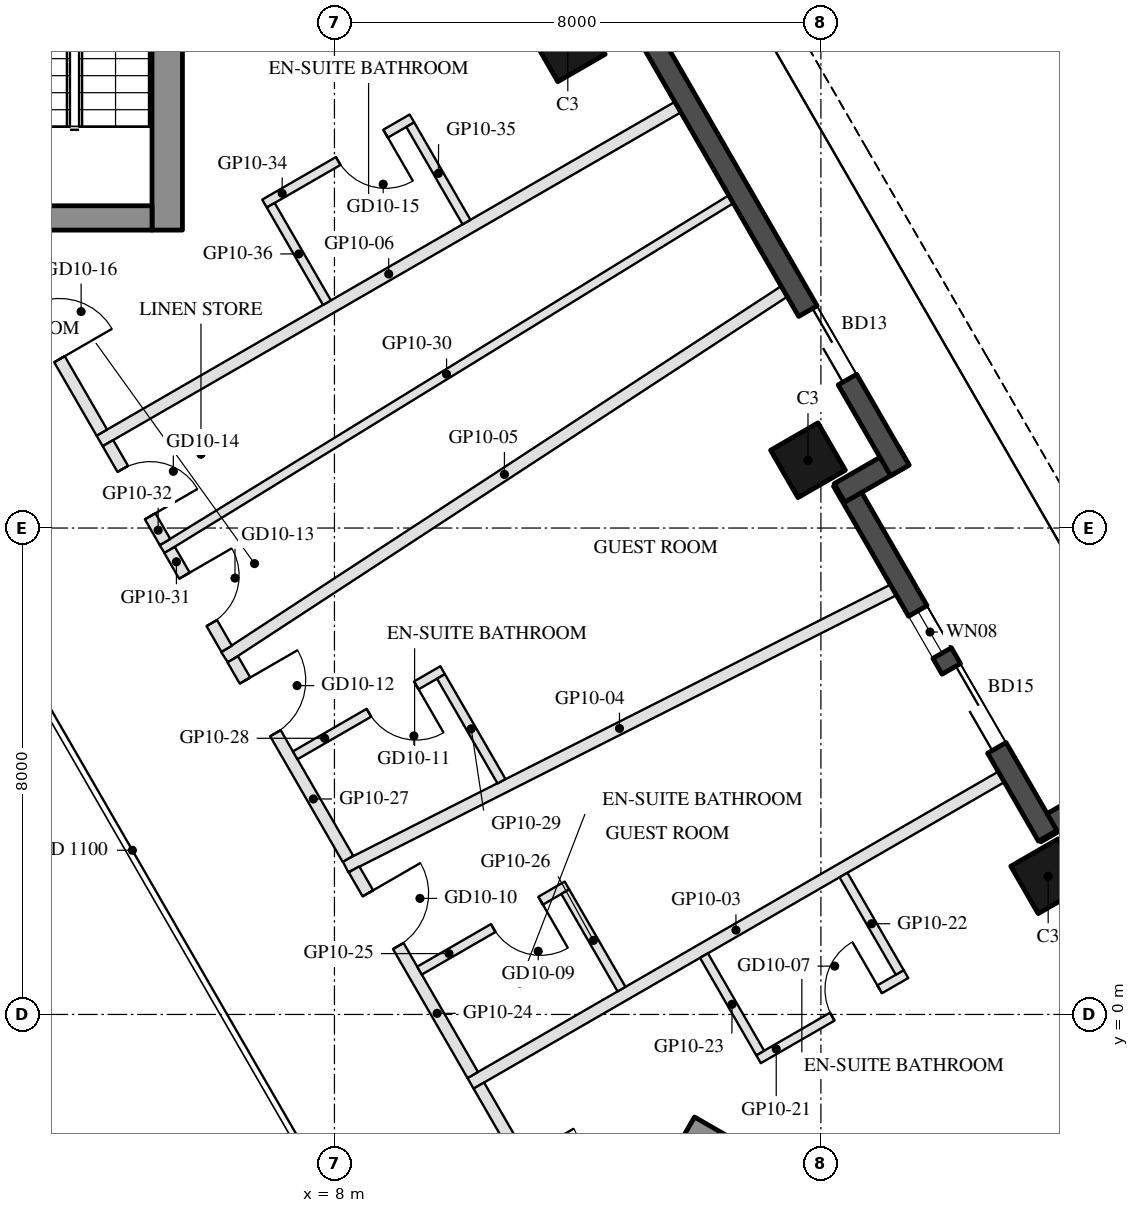
"""IFC4 building model, lengths in metres.
Left out: names, types, materials, properties, quantities, classifications, styles, units other than length and angle.
Written with IfcOpenShell. Run it as: python <this file> out.ifc"""

import sys

from ifc_helpers import new_model, si_unit, direction, frame, frame_2d, origin, origin_2d, place, context, subcontext, project, spatial, rectangle, hollow_rectangle, extrude, element, fill, save


model = new_model("IFC4")
c1 = context("Model", 3, precision=1e-05, world=origin(), true_north=direction((0.0, 1.0)))
c2 = subcontext(c1, "Body", "Model", "MODEL_VIEW")
j1 = project(units=[si_unit("LENGTHUNIT", "METRE"), si_unit("PLANEANGLEUNIT", "RADIAN")], contexts=[c1])
p1 = place(None, origin())
s1 = spatial("IfcSite", under=j1, at=p1, CompositionType="ELEMENT")
p2 = place(p1, origin())
s2 = spatial("IfcBuilding", under=s1, at=p2, CompositionType="ELEMENT")
p3 = place(p2, frame((0.0, 0.0, 116.8)))
s3 = spatial("IfcBuildingStorey", under=s2, at=p3, CompositionType="ELEMENT", Elevation=116.8)
for number, where, z_axis, x_axis in (
    (1, (19.738, 2.273, 0.0), (0.0, 0.0, 1.0), (-0.5, 0.866, 0.0)),
    (2, (15.788, 9.115, 0.0), (0.0, 0.0, 1.0), (-0.5, 0.866, 0.0)),
    (3, (11.838, 15.957, 0.0), (0.0, 0.0, 1.0), (-0.5, 0.866, 0.0)),
):
    element("IfcColumn", number, at=place(p3, frame(where, z_axis=z_axis, x_axis=x_axis)), inside=s3, PredefinedType="COLUMN", context=c2, shape_type="SweptSolid", body=[
        extrude(hollow_rectangle(XDim=0.9, YDim=0.9, WallThickness=0.04, at=origin_2d()), origin(), (0.0, 0.0, 1.0), 3.7),
    ])
p4 = place(p3, frame((20.588, 3.601, 0.0), z_axis=(0.0, 0.0, 1.0), x_axis=(-0.866005645448, -0.500034220881, 0.0)))
e4 = element("IfcWall", 4, at=p4, inside=s3, PredefinedType="SOLIDWALL", context=c2, shape_type="SweptSolid", body=[
    extrude(rectangle(XDim=1.22, YDim=0.35, at=frame_2d((0.61, 0.0))), origin(), (0.0, 0.0, 1.0), 3.55),
])
p5 = place(p3, frame((19.729, 2.938, 0.0), z_axis=(0.0, 0.0, 1.0), x_axis=(-0.499976430342, 0.866039011305, 0.0)))
e5 = element("IfcWall", 5, at=p5, inside=s3, PredefinedType="SOLIDWALL", context=c2, shape_type="SweptSolid", body=[
    extrude(rectangle(XDim=6.74, YDim=0.35, at=frame_2d((3.37, 0.0))), origin(), (0.0, 0.0, 1.0), 3.55),
])
p6 = place(p5, frame((1.67, 0.0, 0.0)))
e6 = element("IfcOpeningElement", 6, at=p6, cuts=e5, PredefinedType="OPENING", context=c2, shape_type="SweptSolid", body=[
    extrude(rectangle(XDim=1.5, YDim=2.4, at=frame_2d((0.75, 1.2))), frame((0.0, 0.185, 0.0), z_axis=(0.0, -1.0, 0.0), x_axis=(1.0, 0.0, 0.0)), (0.0, 0.0, 1.0), 0.37),
])
p7 = place(p5, frame((3.47, 0.0, 0.3)))
e7 = element("IfcOpeningElement", 7, at=p7, cuts=e5, PredefinedType="OPENING", context=c2, shape_type="SweptSolid", body=[
    extrude(rectangle(XDim=0.8, YDim=2.65, at=frame_2d((0.4, 1.325))), frame((0.0, 0.185, 0.0), z_axis=(0.0, -1.0, 0.0), x_axis=(1.0, 0.0, 0.0)), (0.0, 0.0, 1.0), 0.37),
])
p8 = place(p3, frame((16.306, 8.577, 0.0), z_axis=(0.0, 0.0, 1.0), x_axis=(0.866092288191, 0.499884134912, 0.0)))
e8 = element("IfcWall", 8, at=p8, inside=s3, PredefinedType="SOLIDWALL", context=c2, shape_type="SweptSolid", body=[
    extrude(rectangle(XDim=1.22, YDim=0.35, at=frame_2d((0.61, 0.0))), origin(), (0.0, 0.0, 1.0), 3.55),
])
p9 = place(p3, frame((17.299, 8.948, 0.0), z_axis=(0.0, 0.0, 1.0), x_axis=(-0.500010041276, 0.866019606374, 0.0)))
e9 = element("IfcWall", 9, at=p9, inside=s3, PredefinedType="SOLIDWALL", context=c2, shape_type="SweptSolid", body=[
    extrude(rectangle(XDim=9.7, YDim=0.35, at=frame_2d((4.85, 0.0))), origin(), (0.0, 0.0, 1.0), 3.55),
])
p10 = place(p9, frame((1.725, 0.0, 0.0)))
e10 = element("IfcOpeningElement", 10, at=p10, cuts=e9, PredefinedType="OPENING", context=c2, shape_type="SweptSolid", body=[
    extrude(rectangle(XDim=1.3, YDim=2.4, at=frame_2d((0.65, 1.2))), frame((0.0, 0.185, 0.0), z_axis=(0.0, -1.0, 0.0), x_axis=(1.0, 0.0, 0.0)), (0.0, 0.0, 1.0), 0.37),
])
p11 = place(p3, frame((5.25, 12.9, 0.0), z_axis=(0.0, 0.0, 1.0), x_axis=(0.0, 1.0, 0.0)))
e11 = element("IfcWall", 11, at=p11, inside=s3, PredefinedType="SHEAR", context=c2, shape_type="SweptSolid", body=[
    extrude(rectangle(XDim=14.837, YDim=0.5, at=frame_2d((7.418, 0.0))), origin(), (0.0, 0.0, 1.0), 3.5),
])
p12 = place(p3, frame((5.0, 13.1, 0.0), z_axis=(0.0, 0.0, 1.0), x_axis=(-1.0, 0.0, 0.0)))
e12 = element("IfcWall", 12, at=p12, inside=s3, PredefinedType="SHEAR", context=c2, shape_type="SweptSolid", body=[
    extrude(rectangle(XDim=10.0, YDim=0.4, at=frame_2d((5.0, 0.0))), origin(), (0.0, 0.0, 1.0), 3.5),
])
p13 = place(p12, frame((3.55, 0.0, 0.0)))
e13 = element("IfcOpeningElement", 13, at=p13, cuts=e12, PredefinedType="OPENING", context=c2, shape_type="SweptSolid", body=[
    extrude(rectangle(XDim=1.1, YDim=2.1, at=frame_2d((0.55, 1.05))), frame((0.0, 0.21, 0.0), z_axis=(0.0, -1.0, 0.0), x_axis=(1.0, 0.0, 0.0)), (0.0, 0.0, 1.0), 0.42),
])
p14 = place(p12, frame((5.85, 0.0, 0.0)))
e14 = element("IfcOpeningElement", 14, at=p14, cuts=e12, PredefinedType="OPENING", context=c2, shape_type="SweptSolid", body=[
    extrude(rectangle(XDim=1.4, YDim=2.1, at=frame_2d((0.7, 1.05))), frame((0.0, 0.21, 0.0), z_axis=(0.0, -1.0, 0.0), x_axis=(1.0, 0.0, 0.0)), (0.0, 0.0, 1.0), 0.42),
])
p15 = place(p3, frame((13.797, -1.903, 0.0), z_axis=(0.0, 0.0, 1.0), x_axis=(0.866025009528, -0.500000682871, 0.0)))
e15 = element("IfcWall", 15, at=p15, inside=s3, PredefinedType="SHEAR", context=c2, shape_type="SweptSolid", body=[
    extrude(rectangle(XDim=14.837, YDim=0.5, at=frame_2d((7.418, 0.0))), origin(), (0.0, 0.0, 1.0), 3.5),
])
p16 = place(p3, frame((18.968, 3.907, 0.0), z_axis=(0.0, 0.0, 1.0), x_axis=(-0.866022637375, -0.500004791531, 0.0)))
e16 = element("IfcWall", 16, at=p16, inside=s3, PredefinedType="PARTITIONING", context=c2, shape_type="SweptSolid", body=[
    extrude(rectangle(XDim=10.08, YDim=0.2, at=frame_2d((5.04, 0.0))), origin(), (0.0, 0.0, 1.0), 2.96),
])
p17 = place(p3, frame((17.192, 6.982, 0.0), z_axis=(0.0, 0.0, 1.0), x_axis=(-0.892469554868, -0.451107629766, 0.0)))
e17 = element("IfcWall", 17, at=p17, inside=s3, PredefinedType="PARTITIONING", context=c2, shape_type="SweptSolid", body=[
    extrude(rectangle(XDim=10.096, YDim=0.2, at=frame_2d((5.048, 0.0))), origin(), (0.0, 0.0, 1.0), 2.96),
])
p18 = place(p3, frame((15.397, 11.892, 0.0), z_axis=(0.0, 0.0, 1.0), x_axis=(-0.836898817878, -0.547357624076, 0.0)))
e18 = element("IfcWall", 18, at=p18, inside=s3, PredefinedType="PARTITIONING", context=c2, shape_type="SweptSolid", body=[
    extrude(rectangle(XDim=10.997, YDim=0.2, at=frame_2d((5.499, 0.0))), origin(), (0.0, 0.0, 1.0), 2.96),
])
p19 = place(p3, frame((13.647, 14.923, 0.0), z_axis=(0.0, 0.0, 1.0), x_axis=(-0.866027479907, -0.499996404033, 0.0)))
e19 = element("IfcWall", 19, at=p19, inside=s3, PredefinedType="PARTITIONING", context=c2, shape_type="SweptSolid", body=[
    extrude(rectangle(XDim=10.98, YDim=0.2, at=frame_2d((5.49, 0.0))), origin(), (0.0, 0.0, 1.0), 2.96),
])
p20 = place(p3, frame((10.375, -1.169, 0.0), z_axis=(0.0, 0.0, 1.0), x_axis=(0.500055316652, -0.865993464345, 0.0)))
e20 = element("IfcWall", 20, at=p20, inside=s3, PredefinedType="PARTITIONING", context=c2, shape_type="SweptSolid", body=[
    extrude(rectangle(XDim=3.788, YDim=0.2, at=frame_2d((1.894, 0.0))), origin(), (0.0, 0.0, 1.0), 2.95),
])
p21 = place(p20, frame((1.394, 0.0, 0.0)))
e21 = element("IfcOpeningElement", 21, at=p21, cuts=e20, PredefinedType="OPENING", context=c2, shape_type="SweptSolid", body=[
    extrude(rectangle(XDim=1.0, YDim=2.1, at=frame_2d((0.5, 1.05))), frame((0.0, 0.11, 0.0), z_axis=(0.0, -1.0, 0.0), x_axis=(1.0, 0.0, 0.0)), (0.0, 0.0, 1.0), 0.22),
])
p22 = place(p3, frame((14.974, -0.737, 0.0), z_axis=(0.0, 0.0, 1.0), x_axis=(0.866018616679, 0.500011755427, 0.0)))
e22 = element("IfcWall", 22, at=p22, inside=s3, PredefinedType="PARTITIONING", context=c2, shape_type="SweptSolid", body=[
    extrude(rectangle(XDim=2.8, YDim=0.15, at=frame_2d((1.4, 0.0))), origin(), (0.0, 0.0, 1.0), 3.55),
])
p23 = place(p22, frame((1.4, 0.0, 0.0)))
e23 = element("IfcOpeningElement", 23, at=p23, cuts=e22, PredefinedType="OPENING", context=c2, shape_type="SweptSolid", body=[
    extrude(rectangle(XDim=0.9, YDim=2.1, at=frame_2d((0.45, 1.05))), frame((0.0, 0.085, 0.0), z_axis=(0.0, -1.0, 0.0), x_axis=(1.0, 0.0, 0.0)), (0.0, 0.0, 1.0), 0.17),
])
p24 = place(p3, frame((17.297, 0.691, 0.0), z_axis=(0.0, 0.0, 1.0), x_axis=(-0.499985172903, 0.866033964044, 0.0)))
e24 = element("IfcWall", 24, at=p24, inside=s3, PredefinedType="PARTITIONING", context=c2, shape_type="SweptSolid", body=[
    extrude(rectangle(XDim=1.85, YDim=0.15, at=frame_2d((0.925, 0.0))), origin(), (0.0, 0.0, 1.0), 2.95),
])
p25 = place(p3, frame((15.002, -0.634, 0.0), z_axis=(0.0, 0.0, 1.0), x_axis=(-0.500042316284, 0.866000971088, 0.0)))
e25 = element("IfcWall", 25, at=p25, inside=s3, PredefinedType="PARTITIONING", context=c2, shape_type="SweptSolid", body=[
    extrude(rectangle(XDim=1.85, YDim=0.15, at=frame_2d((0.925, 0.0))), origin(), (0.0, 0.0, 1.0), 2.95),
])
p26 = place(p3, frame((8.322, 2.386, 0.0), z_axis=(0.0, 0.0, 1.0), x_axis=(0.499998439657, -0.866026304647, 0.0)))
e26 = element("IfcWall", 26, at=p26, inside=s3, PredefinedType="PARTITIONING", context=c2, shape_type="SweptSolid", body=[
    extrude(rectangle(XDim=3.905, YDim=0.2, at=frame_2d((1.953, 0.0))), origin(), (0.0, 0.0, 1.0), 2.95),
])
p27 = place(p26, frame((0.455, 0.0, 0.0)))
e27 = element("IfcOpeningElement", 27, at=p27, cuts=e26, PredefinedType="OPENING", context=c2, shape_type="SweptSolid", body=[
    extrude(rectangle(XDim=1.0, YDim=2.1, at=frame_2d((0.5, 1.05))), frame((0.0, 0.11, 0.0), z_axis=(0.0, -1.0, 0.0), x_axis=(1.0, 0.0, 0.0)), (0.0, 0.0, 1.0), 0.22),
])
p28 = place(p3, frame((11.823, 2.121, 0.0), z_axis=(0.0, 0.0, 1.0), x_axis=(-0.866034573852, -0.49998411664, 0.0)))
e28 = element("IfcWall", 28, at=p28, inside=s3, PredefinedType="PARTITIONING", context=c2, shape_type="SweptSolid", body=[
    extrude(rectangle(XDim=2.8, YDim=0.15, at=frame_2d((1.4, 0.0))), origin(), (0.0, 0.0, 1.0), 2.95),
])
p29 = place(p28, frame((0.5, 0.0, 0.0)))
e29 = element("IfcOpeningElement", 29, at=p29, cuts=e28, PredefinedType="OPENING", context=c2, shape_type="SweptSolid", body=[
    extrude(rectangle(XDim=0.9, YDim=2.1, at=frame_2d((0.45, 1.05))), frame((0.0, 0.085, 0.0), z_axis=(0.0, -1.0, 0.0), x_axis=(1.0, 0.0, 0.0)), (0.0, 0.0, 1.0), 0.17),
])
p30 = place(p3, frame((12.721, 0.416, 0.0), z_axis=(0.0, 0.0, 1.0), x_axis=(-0.499985172903, 0.866033964044, 0.0)))
e30 = element("IfcWall", 30, at=p30, inside=s3, PredefinedType="PARTITIONING", context=c2, shape_type="SweptSolid", body=[
    extrude(rectangle(XDim=1.85, YDim=0.15, at=frame_2d((0.925, 0.0))), origin(), (0.0, 0.0, 1.0), 3.55),
])
p31 = place(p3, frame((6.327, 5.841, 0.0), z_axis=(0.0, 0.0, 1.0), x_axis=(0.499999503755, -0.866025690291, 0.0)))
e31 = element("IfcWall", 31, at=p31, inside=s3, PredefinedType="PARTITIONING", context=c2, shape_type="SweptSolid", body=[
    extrude(rectangle(XDim=3.789, YDim=0.2, at=frame_2d((1.894, 0.0))), origin(), (0.0, 0.0, 1.0), 2.95),
])
p32 = place(p31, frame((0.403, 0.0, 0.0)))
e32 = element("IfcOpeningElement", 32, at=p32, cuts=e31, PredefinedType="OPENING", context=c2, shape_type="SweptSolid", body=[
    extrude(rectangle(XDim=1.0, YDim=2.1, at=frame_2d((0.5, 1.05))), frame((0.0, 0.11, 0.0), z_axis=(0.0, -1.0, 0.0), x_axis=(1.0, 0.0, 0.0)), (0.0, 0.0, 1.0), 0.22),
])
p33 = place(p3, frame((9.779, 5.662, 0.0), z_axis=(0.0, 0.0, 1.0), x_axis=(-0.866034573852, -0.49998411664, 0.0)))
e33 = element("IfcWall", 33, at=p33, inside=s3, PredefinedType="PARTITIONING", context=c2, shape_type="SweptSolid", body=[
    extrude(rectangle(XDim=2.8, YDim=0.15, at=frame_2d((1.4, 0.0))), origin(), (0.0, 0.0, 1.0), 2.95),
])
p34 = place(p33, frame((0.5, 0.0, 0.0)))
e34 = element("IfcOpeningElement", 34, at=p34, cuts=e33, PredefinedType="OPENING", context=c2, shape_type="SweptSolid", body=[
    extrude(rectangle(XDim=0.9, YDim=2.1, at=frame_2d((0.45, 1.05))), frame((0.0, 0.085, 0.0), z_axis=(0.0, -1.0, 0.0), x_axis=(1.0, 0.0, 0.0)), (0.0, 0.0, 1.0), 0.17),
])
p35 = place(p3, frame((10.747, 3.836, 0.0), z_axis=(0.0, 0.0, 1.0), x_axis=(-0.499991453095, 0.866030338286, 0.0)))
e35 = element("IfcWall", 35, at=p35, inside=s3, PredefinedType="PARTITIONING", context=c2, shape_type="SweptSolid", body=[
    extrude(rectangle(XDim=1.99, YDim=0.15, at=frame_2d((0.995, 0.0))), origin(), (0.0, 0.0, 1.0), 2.95),
])
p36 = place(p3, frame((14.522, 13.407, 0.0), z_axis=(0.0, 0.0, 1.0), x_axis=(-0.851781158383, -0.523897755506, 0.0)))
e36 = element("IfcWall", 36, at=p36, inside=s3, PredefinedType="PARTITIONING", context=c2, shape_type="SweptSolid", body=[
    extrude(rectangle(XDim=10.984, YDim=0.15, at=frame_2d((5.492, 0.0))), origin(), (0.0, 0.0, 1.0), 2.95),
])
p37 = place(p3, frame((5.289, 7.64, 0.0), z_axis=(0.0, 0.0, 1.0), x_axis=(0.499985098601, -0.86603400694, 0.0)))
e37 = element("IfcWall", 37, at=p37, inside=s3, PredefinedType="PARTITIONING", context=c2, shape_type="SweptSolid", body=[
    extrude(rectangle(XDim=1.877, YDim=0.2, at=frame_2d((0.939, 0.0))), origin(), (0.0, 0.0, 1.0), 2.95),
])
p38 = place(p37, frame((0.489, 0.0, 0.0)))
e38 = element("IfcOpeningElement", 38, at=p38, cuts=e37, PredefinedType="OPENING", context=c2, shape_type="SweptSolid", body=[
    extrude(rectangle(XDim=0.9, YDim=2.1, at=frame_2d((0.45, 1.05))), frame((0.0, 0.11, 0.0), z_axis=(0.0, -1.0, 0.0), x_axis=(1.0, 0.0, 0.0)), (0.0, 0.0, 1.0), 0.22),
])
p39 = place(p3, frame((4.275, 9.396, 0.0), z_axis=(0.0, 0.0, 1.0), x_axis=(0.499928798138, -0.866066508296, 0.0)))
e39 = element("IfcWall", 39, at=p39, inside=s3, PredefinedType="PARTITIONING", context=c2, shape_type="SweptSolid", body=[
    extrude(rectangle(XDim=1.878, YDim=0.2, at=frame_2d((0.939, 0.0))), origin(), (0.0, 0.0, 1.0), 3.55),
])
p40 = place(p39, frame((0.489, 0.0, 0.0)))
e40 = element("IfcOpeningElement", 40, at=p40, cuts=e39, PredefinedType="OPENING", context=c2, shape_type="SweptSolid", body=[
    extrude(rectangle(XDim=0.9, YDim=2.1, at=frame_2d((0.45, 1.05))), frame((0.0, 0.11, 0.0), z_axis=(0.0, -1.0, 0.0), x_axis=(1.0, 0.0, 0.0)), (0.0, 0.0, 1.0), 0.22),
])
p41 = place(p3, frame((2.281, 12.85, 0.0), z_axis=(0.0, 0.0, 1.0), x_axis=(0.499979074716, -0.866037484666, 0.0)))
e41 = element("IfcWall", 41, at=p41, inside=s3, PredefinedType="PARTITIONING", context=c2, shape_type="SweptSolid", body=[
    extrude(rectangle(XDim=3.788, YDim=0.2, at=frame_2d((1.894, 0.0))), origin(), (0.0, 0.0, 1.0), 2.95),
])
p42 = place(p41, frame((1.394, 0.0, 0.0)))
e42 = element("IfcOpeningElement", 42, at=p42, cuts=e41, PredefinedType="OPENING", context=c2, shape_type="SweptSolid", body=[
    extrude(rectangle(XDim=1.0, YDim=2.1, at=frame_2d((0.5, 1.05))), frame((0.0, 0.11, 0.0), z_axis=(0.0, -1.0, 0.0), x_axis=(1.0, 0.0, 0.0)), (0.0, 0.0, 1.0), 0.22),
])
p43 = place(p3, frame((9.274, 14.737, 0.0), z_axis=(0.0, 0.0, 1.0), x_axis=(-0.866018616679, -0.500011755427, 0.0)))
e43 = element("IfcWall", 43, at=p43, inside=s3, PredefinedType="PARTITIONING", context=c2, shape_type="SweptSolid", body=[
    extrude(rectangle(XDim=2.8, YDim=0.15, at=frame_2d((1.4, 0.0))), origin(), (0.0, 0.0, 1.0), 3.55),
])
p44 = place(p43, frame((0.5, 0.0, 0.0)))
e44 = element("IfcOpeningElement", 44, at=p44, cuts=e43, PredefinedType="OPENING", context=c2, shape_type="SweptSolid", body=[
    extrude(rectangle(XDim=0.9, YDim=2.1, at=frame_2d((0.45, 1.05))), frame((0.0, 0.085, 0.0), z_axis=(0.0, -1.0, 0.0), x_axis=(1.0, 0.0, 0.0)), (0.0, 0.0, 1.0), 0.17),
])
p45 = place(p3, frame((10.172, 13.032, 0.0), z_axis=(0.0, 0.0, 1.0), x_axis=(-0.500042316284, 0.866000971088, 0.0)))
e45 = element("IfcWall", 45, at=p45, inside=s3, PredefinedType="PARTITIONING", context=c2, shape_type="SweptSolid", body=[
    extrude(rectangle(XDim=1.85, YDim=0.15, at=frame_2d((0.925, 0.0))), origin(), (0.0, 0.0, 1.0), 2.95),
])
p46 = place(p3, frame((7.877, 11.707, 0.0), z_axis=(0.0, 0.0, 1.0), x_axis=(-0.499985172903, 0.866033964044, 0.0)))
e46 = element("IfcWall", 46, at=p46, inside=s3, PredefinedType="PARTITIONING", context=c2, shape_type="SweptSolid", body=[
    extrude(rectangle(XDim=1.85, YDim=0.15, at=frame_2d((0.925, 0.0))), origin(), (0.0, 0.0, 1.0), 2.95),
])
p47 = place(p6, frame((1.5, 0.0, 0.0), z_axis=(0.0, 0.0, 1.0), x_axis=(-1.0, 0.0, 0.0)))
e47 = element("IfcDoor", 47, at=p47, inside=s3, OperationType="SLIDING_TO_LEFT", PredefinedType="DOOR", context=c2, shape_type="SweptSolid", body=[
    extrude(rectangle(XDim=1.5, YDim=2.4, at=frame_2d((0.75, 1.2))), frame((0.0, 0.025, 0.0), z_axis=(0.0, -1.0, 0.0), x_axis=(1.0, 0.0, 0.0)), (0.0, 0.0, 1.0), 0.05),
])
fill(e6, e47)
p48 = place(p7, origin())
e48 = element("IfcWindow", 48, at=p48, inside=s3, PartitioningType="SINGLE_PANEL", PredefinedType="WINDOW", context=c2, shape_type="SweptSolid", body=[
    extrude(rectangle(XDim=0.8, YDim=2.65, at=frame_2d((0.4, 1.325))), frame((0.0, 0.03, 0.0), z_axis=(0.0, -1.0, 0.0), x_axis=(1.0, 0.0, 0.0)), (0.0, 0.0, 1.0), 0.06),
])
fill(e7, e48)
p49 = place(p10, frame((1.3, 0.0, 0.0), z_axis=(0.0, 0.0, 1.0), x_axis=(-1.0, 0.0, 0.0)))
e49 = element("IfcDoor", 49, at=p49, inside=s3, OperationType="SLIDING_TO_LEFT", PredefinedType="DOOR", context=c2, shape_type="SweptSolid", body=[
    extrude(rectangle(XDim=1.3, YDim=2.4, at=frame_2d((0.65, 1.2))), frame((0.0, 0.025, 0.0), z_axis=(0.0, -1.0, 0.0), x_axis=(1.0, 0.0, 0.0)), (0.0, 0.0, 1.0), 0.05),
])
fill(e10, e49)
p50 = place(p23, origin())
e50 = element("IfcDoor", 50, at=p50, inside=s3, OperationType="SINGLE_SWING_RIGHT", PredefinedType="DOOR", context=c2, shape_type="SweptSolid", body=[
    extrude(rectangle(XDim=0.9, YDim=2.1, at=frame_2d((0.45, 1.05))), frame((0.0, 0.025, 0.0), z_axis=(0.0, -1.0, 0.0), x_axis=(1.0, 0.0, 0.0)), (0.0, 0.0, 1.0), 0.05),
])
fill(e23, e50)
p51 = place(p29, origin())
e51 = element("IfcDoor", 51, at=p51, inside=s3, OperationType="SINGLE_SWING_LEFT", PredefinedType="DOOR", context=c2, shape_type="SweptSolid", body=[
    extrude(rectangle(XDim=0.9, YDim=2.1, at=frame_2d((0.45, 1.05))), frame((0.0, 0.025, 0.0), z_axis=(0.0, -1.0, 0.0), x_axis=(1.0, 0.0, 0.0)), (0.0, 0.0, 1.0), 0.05),
])
fill(e29, e51)
p52 = place(p27, origin())
e52 = element("IfcDoor", 52, at=p52, inside=s3, OperationType="SINGLE_SWING_LEFT", PredefinedType="DOOR", context=c2, shape_type="SweptSolid", body=[
    extrude(rectangle(XDim=1.0, YDim=2.1, at=frame_2d((0.5, 1.05))), frame((0.0, 0.025, 0.0), z_axis=(0.0, -1.0, 0.0), x_axis=(1.0, 0.0, 0.0)), (0.0, 0.0, 1.0), 0.05),
])
fill(e27, e52)
p53 = place(p34, origin())
e53 = element("IfcDoor", 53, at=p53, inside=s3, OperationType="SINGLE_SWING_LEFT", PredefinedType="DOOR", context=c2, shape_type="SweptSolid", body=[
    extrude(rectangle(XDim=0.9, YDim=2.1, at=frame_2d((0.45, 1.05))), frame((0.0, 0.025, 0.0), z_axis=(0.0, -1.0, 0.0), x_axis=(1.0, 0.0, 0.0)), (0.0, 0.0, 1.0), 0.05),
])
fill(e34, e53)
p54 = place(p32, origin())
e54 = element("IfcDoor", 54, at=p54, inside=s3, OperationType="SINGLE_SWING_LEFT", PredefinedType="DOOR", context=c2, shape_type="SweptSolid", body=[
    extrude(rectangle(XDim=1.0, YDim=2.1, at=frame_2d((0.5, 1.05))), frame((0.0, 0.025, 0.0), z_axis=(0.0, -1.0, 0.0), x_axis=(1.0, 0.0, 0.0)), (0.0, 0.0, 1.0), 0.05),
])
fill(e32, e54)
p55 = place(p38, origin())
e55 = element("IfcDoor", 55, at=p55, inside=s3, OperationType="SINGLE_SWING_LEFT", PredefinedType="DOOR", context=c2, shape_type="SweptSolid", body=[
    extrude(rectangle(XDim=0.9, YDim=2.1, at=frame_2d((0.45, 1.05))), frame((0.0, 0.025, 0.0), z_axis=(0.0, -1.0, 0.0), x_axis=(1.0, 0.0, 0.0)), (0.0, 0.0, 1.0), 0.05),
])
fill(e38, e55)
p56 = place(p40, origin())
e56 = element("IfcDoor", 56, at=p56, inside=s3, OperationType="SINGLE_SWING_RIGHT", PredefinedType="DOOR", context=c2, shape_type="SweptSolid", body=[
    extrude(rectangle(XDim=0.9, YDim=2.1, at=frame_2d((0.45, 1.05))), frame((0.0, 0.025, 0.0), z_axis=(0.0, -1.0, 0.0), x_axis=(1.0, 0.0, 0.0)), (0.0, 0.0, 1.0), 0.05),
])
fill(e40, e56)
p57 = place(p44, origin())
e57 = element("IfcDoor", 57, at=p57, inside=s3, OperationType="SINGLE_SWING_LEFT", PredefinedType="DOOR", context=c2, shape_type="SweptSolid", body=[
    extrude(rectangle(XDim=0.9, YDim=2.1, at=frame_2d((0.45, 1.05))), frame((0.0, 0.025, 0.0), z_axis=(0.0, -1.0, 0.0), x_axis=(1.0, 0.0, 0.0)), (0.0, 0.0, 1.0), 0.05),
])
fill(e44, e57)
p58 = place(p42, origin())
e58 = element("IfcDoor", 58, at=p58, inside=s3, OperationType="SINGLE_SWING_RIGHT", PredefinedType="DOOR", context=c2, shape_type="SweptSolid", body=[
    extrude(rectangle(XDim=1.0, YDim=2.1, at=frame_2d((0.5, 1.05))), frame((0.0, 0.025, 0.0), z_axis=(0.0, -1.0, 0.0), x_axis=(1.0, 0.0, 0.0)), (0.0, 0.0, 1.0), 0.05),
])
fill(e42, e58)
save(model, sys.argv[1])
